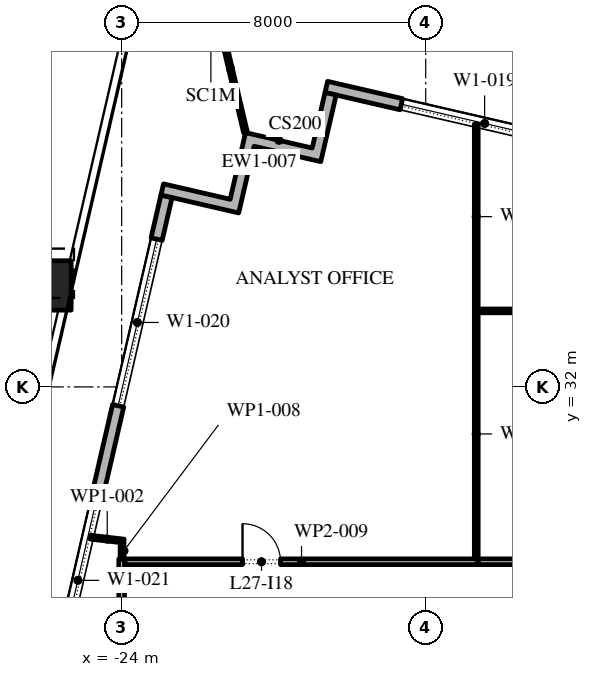
"""IFC4 building model, lengths in metres.
Left out: names, types, materials, properties, quantities, classifications, styles, units other than length and angle.
Written with IfcOpenShell. Run it as: python <this file> out.ifc"""

import sys

from ifc_helpers import new_model, si_unit, direction, frame, frame_2d, origin, origin_2d, place, context, subcontext, project, spatial, polyline, rectangle, outline, extrude, element, fill, save


model = new_model("IFC4")
c1 = context("Model", 3, precision=1e-05, world=origin(), true_north=direction((0.0, 1.0)))
c2 = subcontext(c1, "Body", "Model", "MODEL_VIEW")
j1 = project(units=[si_unit("LENGTHUNIT", "METRE"), si_unit("PLANEANGLEUNIT", "RADIAN")], contexts=[c1])
p1 = place(None, origin())
s1 = spatial("IfcSite", under=j1, at=p1, CompositionType="ELEMENT")
p2 = place(p1, origin())
s2 = spatial("IfcBuilding", under=s1, at=p2, CompositionType="ELEMENT")
p3 = place(p2, frame((0.0, 0.0, 126.6)))
s3 = spatial("IfcBuildingStorey", under=s2, at=p3, CompositionType="ELEMENT", Elevation=126.6)
p4 = place(p3, frame((-25.979, 34.67, 0.0), z_axis=(0.017444089556, 0.075687644385, 0.996978978829), x_axis=(-0.974454034257, 0.224587032398, 0.0)))
e1 = element("IfcColumn", 1, at=p4, inside=s3, PredefinedType="COLUMN", context=c2, shape_type="SweptSolid", body=[
    extrude(rectangle(XDim=1.3, YDim=1.3, at=origin_2d()), origin(), (0.0, 0.0, 1.0), 4.213),
])
p5 = place(p3, frame((31.078, 28.421, 0.0), z_axis=(0.0, 0.0, 1.0), x_axis=(-0.974370456532, 0.224949357493, 0.0)))
e2 = element("IfcWall", 2, at=p5, inside=s3, PredefinedType="STANDARD", context=c2, shape_type="SweptSolid", body=[
    extrude(rectangle(XDim=51.0, YDim=0.3, at=frame_2d((25.5, 0.0))), origin(), (0.0, 0.0, 1.0), 4.0),
])
p6 = place(p5, frame((1.875, 0.0, 0.45)))
e3 = element("IfcOpeningElement", 3, at=p6, cuts=e2, PredefinedType="OPENING", context=c2, shape_type="SweptSolid", body=[
    extrude(rectangle(XDim=4.5, YDim=2.95, at=frame_2d((2.25, 1.475))), frame((0.0, 0.16, 0.0), z_axis=(0.0, -1.0, 0.0), x_axis=(1.0, 0.0, 0.0)), (0.0, 0.0, 1.0), 0.32),
])
p7 = place(p5, frame((10.275, 0.0, 0.45)))
e4 = element("IfcOpeningElement", 4, at=p7, cuts=e2, PredefinedType="OPENING", context=c2, shape_type="SweptSolid", body=[
    extrude(rectangle(XDim=4.5, YDim=2.875, at=frame_2d((2.25, 1.438))), frame((0.0, 0.16, 0.0), z_axis=(0.0, -1.0, 0.0), x_axis=(1.0, 0.0, 0.0)), (0.0, 0.0, 1.0), 0.32),
])
p8 = place(p5, frame((18.825, 0.0, 0.45)))
e5 = element("IfcOpeningElement", 5, at=p8, cuts=e2, PredefinedType="OPENING", context=c2, shape_type="SweptSolid", body=[
    extrude(rectangle(XDim=4.5, YDim=2.825, at=frame_2d((2.25, 1.413))), frame((0.0, 0.16, 0.0), z_axis=(0.0, -1.0, 0.0), x_axis=(1.0, 0.0, 0.0)), (0.0, 0.0, 1.0), 0.32),
])
p9 = place(p5, frame((27.075, 0.0, 0.0)))
e6 = element("IfcOpeningElement", 6, at=p9, cuts=e2, PredefinedType="OPENING", context=c2, shape_type="SweptSolid", body=[
    extrude(rectangle(XDim=2.4, YDim=3.125, at=frame_2d((1.2, 1.562))), frame((0.0, 0.16, 0.0), z_axis=(0.0, -1.0, 0.0), x_axis=(1.0, 0.0, 0.0)), (0.0, 0.0, 1.0), 0.32),
])
p10 = place(p5, frame((35.925, 0.0, 0.45)))
e7 = element("IfcOpeningElement", 7, at=p10, cuts=e2, PredefinedType="OPENING", context=c2, shape_type="SweptSolid", body=[
    extrude(rectangle(XDim=4.5, YDim=2.575, at=frame_2d((2.25, 1.288))), frame((0.0, 0.16, 0.0), z_axis=(0.0, -1.0, 0.0), x_axis=(1.0, 0.0, 0.0)), (0.0, 0.0, 1.0), 0.32),
])
p11 = place(p5, frame((44.475, 0.0, 0.45)))
e8 = element("IfcOpeningElement", 8, at=p11, cuts=e2, PredefinedType="OPENING", context=c2, shape_type="SweptSolid", body=[
    extrude(rectangle(XDim=4.5, YDim=3.05, at=frame_2d((2.25, 1.525))), frame((0.0, 0.16, 0.0), z_axis=(0.0, -1.0, 0.0), x_axis=(1.0, 0.0, 0.0)), (0.0, 0.0, 1.0), 0.32),
])
p12 = place(p3, frame((-22.82, 37.016, 0.0), z_axis=(0.0, 0.0, 1.0), x_axis=(-0.224953880882, -0.974369412223, 0.0)))
e9 = element("IfcWall", 9, at=p12, inside=s3, PredefinedType="STANDARD", context=c2, shape_type="SweptSolid", body=[
    extrude(rectangle(XDim=49.5, YDim=0.3, at=frame_2d((24.75, 0.0))), origin(), (0.0, 0.0, 1.0), 4.0),
])
p13 = place(p12, frame((1.157, 0.0, 0.45)))
e10 = element("IfcOpeningElement", 10, at=p13, cuts=e9, PredefinedType="OPENING", context=c2, shape_type="SweptSolid", body=[
    extrude(rectangle(XDim=4.5, YDim=3.05, at=frame_2d((2.25, 1.525))), frame((0.0, 0.16, 0.0), z_axis=(0.0, -1.0, 0.0), x_axis=(1.0, 0.0, 0.0)), (0.0, 0.0, 1.0), 0.32),
])
p14 = place(p12, frame((8.121, 0.0, 0.45)))
e11 = element("IfcOpeningElement", 11, at=p14, cuts=e9, PredefinedType="OPENING", context=c2, shape_type="SweptSolid", body=[
    extrude(rectangle(XDim=4.5, YDim=3.05, at=frame_2d((2.25, 1.525))), frame((0.0, 0.16, 0.0), z_axis=(0.0, -1.0, 0.0), x_axis=(1.0, 0.0, 0.0)), (0.0, 0.0, 1.0), 0.32),
])
p15 = place(p12, frame((15.236, 0.0, 0.45)))
e12 = element("IfcOpeningElement", 12, at=p15, cuts=e9, PredefinedType="OPENING", context=c2, shape_type="SweptSolid", body=[
    extrude(rectangle(XDim=4.5, YDim=3.05, at=frame_2d((2.25, 1.525))), frame((0.0, 0.16, 0.0), z_axis=(0.0, -1.0, 0.0), x_axis=(1.0, 0.0, 0.0)), (0.0, 0.0, 1.0), 0.32),
])
p16 = place(p12, frame((23.4, 0.0, 0.0)))
e13 = element("IfcOpeningElement", 13, at=p16, cuts=e9, PredefinedType="OPENING", context=c2, shape_type="SweptSolid", body=[
    extrude(rectangle(XDim=2.4, YDim=3.5, at=frame_2d((1.2, 1.75))), frame((0.0, 0.16, 0.0), z_axis=(0.0, -1.0, 0.0), x_axis=(1.0, 0.0, 0.0)), (0.0, 0.0, 1.0), 0.32),
])
p17 = place(p12, frame((29.464, 0.0, 0.45)))
e14 = element("IfcOpeningElement", 14, at=p17, cuts=e9, PredefinedType="OPENING", context=c2, shape_type="SweptSolid", body=[
    extrude(rectangle(XDim=4.5, YDim=2.875, at=frame_2d((2.25, 1.438))), frame((0.0, 0.16, 0.0), z_axis=(0.0, -1.0, 0.0), x_axis=(1.0, 0.0, 0.0)), (0.0, 0.0, 1.0), 0.32),
])
p18 = place(p12, frame((36.579, 0.0, 0.45)))
e15 = element("IfcOpeningElement", 15, at=p18, cuts=e9, PredefinedType="OPENING", context=c2, shape_type="SweptSolid", body=[
    extrude(rectangle(XDim=4.5, YDim=2.675, at=frame_2d((2.25, 1.337))), frame((0.0, 0.16, 0.0), z_axis=(0.0, -1.0, 0.0), x_axis=(1.0, 0.0, 0.0)), (0.0, 0.0, 1.0), 0.32),
])
p19 = place(p12, frame((43.693, 0.0, 0.45)))
e16 = element("IfcOpeningElement", 16, at=p19, cuts=e9, PredefinedType="OPENING", context=c2, shape_type="SweptSolid", body=[
    extrude(rectangle(XDim=4.5, YDim=3.05, at=frame_2d((2.25, 1.525))), frame((0.0, 0.16, 0.0), z_axis=(0.0, -1.0, 0.0), x_axis=(1.0, 0.0, 0.0)), (0.0, 0.0, 1.0), 0.32),
])
p20 = place(p3, origin())
e17 = element("IfcWall", 17, at=p20, inside=s3, PredefinedType="STANDARD", context=c2, shape_type="SweptSolid", body=[
    extrude(outline(polyline([(-22.967, 37.049), (-22.899, 37.342), (-21.145, 36.937), (-20.74, 38.691), (-18.986, 38.286), (-18.649, 39.747), (-18.357, 39.68), (-18.762, 37.926), (-20.515, 38.331), (-20.92, 36.577), (-22.967, 37.049)])), origin(), (0.0, 0.0, 1.0), 4.0),
])
p21 = place(p3, frame((-20.74, 38.691, -0.05), z_axis=(0.0, 0.0, 1.0), x_axis=(-0.23016174079, 0.973152389442, 0.0)))
e18 = element("IfcWall", 18, at=p21, inside=s3, PredefinedType="STANDARD", context=c2, shape_type="SweptSolid", body=[
    extrude(rectangle(XDim=3.455, YDim=0.1, at=frame_2d((1.728, 0.0))), origin(), (0.0, 0.0, 1.0), 4.05),
])
p22 = place(p3, frame((-24.82, 28.045, 0.0), z_axis=(0.0, 0.0, 1.0), x_axis=(0.993501545499, -0.113818623659, 0.0)))
e19 = element("IfcWall", 19, at=p22, inside=s3, PredefinedType="PARTITIONING", context=c2, shape_type="SweptSolid", body=[
    extrude(rectangle(XDim=0.886, YDim=0.1, at=frame_2d((0.443, 0.0))), origin(), (0.0, 0.0, 1.0), 4.0),
])
p23 = place(p3, frame((-24.0, 3.45, 0.0), z_axis=(0.0, 0.0, 1.0), x_axis=(0.0, 1.0, 0.0)))
e20 = element("IfcWall", 20, at=p23, inside=s3, PredefinedType="PARTITIONING", context=c2, shape_type="SweptSolid", body=[
    extrude(rectangle(XDim=24.025, YDim=0.15, at=frame_2d((12.013, 0.0))), origin(), (0.0, 0.0, 1.0), 4.0),
])
p24 = place(p23, frame((16.3, 0.0, 0.0)))
e21 = element("IfcOpeningElement", 21, at=p24, cuts=e20, PredefinedType="OPENING", context=c2, shape_type="SweptSolid", body=[
    extrude(rectangle(XDim=1.0, YDim=2.1, at=frame_2d((0.5, 1.05))), frame((0.0, 0.085, 0.0), z_axis=(0.0, -1.0, 0.0), x_axis=(1.0, 0.0, 0.0)), (0.0, 0.0, 1.0), 0.17),
])
p25 = place(p3, frame((-23.99, 27.475, 0.0), z_axis=(0.0, 0.0, 1.0), x_axis=(0.0, 1.0, 0.0)))
e22 = element("IfcWall", 22, at=p25, inside=s3, PredefinedType="PARTITIONING", context=c2, shape_type="SweptSolid", body=[
    extrude(rectangle(XDim=0.425, YDim=0.1, at=frame_2d((0.212, 0.0))), origin(), (0.0, 0.0, 1.0), 4.0),
])
p26 = place(p3, frame((-23.915, 27.4, 0.0), z_axis=(0.0, 0.0, 1.0), x_axis=(1.0, 0.0, 0.0)))
e23 = element("IfcWall", 23, at=p26, inside=s3, PredefinedType="PARTITIONING", context=c2, shape_type="SweptSolid", body=[
    extrude(rectangle(XDim=9.295, YDim=0.15, at=frame_2d((4.647, 0.0))), origin(), (0.0, 0.0, 1.0), 4.0),
])
p27 = place(p26, frame((3.095, 0.0, 0.0)))
e24 = element("IfcOpeningElement", 24, at=p27, cuts=e23, PredefinedType="OPENING", context=c2, shape_type="SweptSolid", body=[
    extrude(rectangle(XDim=1.0, YDim=2.1, at=frame_2d((0.5, 1.05))), frame((0.0, 0.085, 0.0), z_axis=(0.0, -1.0, 0.0), x_axis=(1.0, 0.0, 0.0)), (0.0, 0.0, 1.0), 0.17),
])
p28 = place(p3, frame((-14.67, 27.475, 0.0), z_axis=(0.0, 0.0, 1.0), x_axis=(0.0, 1.0, 0.0)))
e25 = element("IfcWall", 25, at=p28, inside=s3, PredefinedType="PARTITIONING", context=c2, shape_type="SweptSolid", body=[
    extrude(rectangle(XDim=6.575, YDim=0.1, at=frame_2d((3.288, 0.0))), origin(), (0.0, 0.0, 1.0), 4.0),
])
p29 = place(p3, frame((-14.62, 27.4, 0.0), z_axis=(0.0, 0.0, 1.0), x_axis=(1.0, 0.0, 0.0)))
e26 = element("IfcWall", 26, at=p29, inside=s3, PredefinedType="PARTITIONING", context=c2, shape_type="SweptSolid", body=[
    extrude(rectangle(XDim=6.695, YDim=0.15, at=frame_2d((3.348, 0.0))), origin(), (0.0, 0.0, 1.0), 4.0),
])
p30 = place(p3, frame((-14.67, 34.05, 0.0), z_axis=(0.0, 0.0, 1.0), x_axis=(0.0, 1.0, 0.0)))
e27 = element("IfcWall", 27, at=p30, inside=s3, PredefinedType="PARTITIONING", context=c2, shape_type="SweptSolid", body=[
    extrude(rectangle(XDim=4.861, YDim=0.1, at=frame_2d((2.43, 0.0))), origin(), (0.0, 0.0, 1.0), 4.0),
])
p31 = place(p3, frame((-3.95, 34.0, 0.0), z_axis=(0.0, 0.0, 1.0), x_axis=(-1.0, 0.0, 0.0)))
e28 = element("IfcWall", 28, at=p31, inside=s3, PredefinedType="PARTITIONING", context=c2, shape_type="SweptSolid", body=[
    extrude(rectangle(XDim=10.67, YDim=0.1, at=frame_2d((5.335, 0.0))), origin(), (0.0, 0.0, 1.0), 4.0),
])
p32 = place(p31, frame((7.0, 0.0, 0.0)))
e29 = element("IfcOpeningElement", 29, at=p32, cuts=e28, PredefinedType="OPENING", context=c2, shape_type="SweptSolid", body=[
    extrude(rectangle(XDim=0.9, YDim=2.1, at=frame_2d((0.45, 1.05))), frame((0.0, 0.06, 0.0), z_axis=(0.0, -1.0, 0.0), x_axis=(1.0, 0.0, 0.0)), (0.0, 0.0, 1.0), 0.12),
])
p33 = place(p11, origin())
e30 = element("IfcWindow", 30, at=p33, inside=s3, PartitioningType="DOUBLE_PANEL_VERTICAL", PredefinedType="WINDOW", context=c2, shape_type="SweptSolid", body=[
    extrude(rectangle(XDim=4.5, YDim=3.05, at=frame_2d((2.25, 1.525))), frame((0.0, 0.03, 0.0), z_axis=(0.0, -1.0, 0.0), x_axis=(1.0, 0.0, 0.0)), (0.0, 0.0, 1.0), 0.06),
])
fill(e8, e30)
p34 = place(p13, origin())
e31 = element("IfcWindow", 31, at=p34, inside=s3, PartitioningType="DOUBLE_PANEL_VERTICAL", PredefinedType="WINDOW", context=c2, shape_type="SweptSolid", body=[
    extrude(rectangle(XDim=4.5, YDim=3.05, at=frame_2d((2.25, 1.525))), frame((0.0, 0.03, 0.0), z_axis=(0.0, -1.0, 0.0), x_axis=(1.0, 0.0, 0.0)), (0.0, 0.0, 1.0), 0.06),
])
fill(e10, e31)
p35 = place(p14, origin())
e32 = element("IfcWindow", 32, at=p35, inside=s3, PartitioningType="DOUBLE_PANEL_VERTICAL", PredefinedType="WINDOW", context=c2, shape_type="SweptSolid", body=[
    extrude(rectangle(XDim=4.5, YDim=3.05, at=frame_2d((2.25, 1.525))), frame((0.0, 0.03, 0.0), z_axis=(0.0, -1.0, 0.0), x_axis=(1.0, 0.0, 0.0)), (0.0, 0.0, 1.0), 0.06),
])
fill(e11, e32)
p36 = place(p27, origin())
e33 = element("IfcDoor", 33, at=p36, inside=s3, OperationType="SINGLE_SWING_RIGHT", PredefinedType="DOOR", context=c2, shape_type="SweptSolid", body=[
    extrude(rectangle(XDim=1.0, YDim=2.1, at=frame_2d((0.5, 1.05))), frame((0.0, 0.025, 0.0), z_axis=(0.0, -1.0, 0.0), x_axis=(1.0, 0.0, 0.0)), (0.0, 0.0, 1.0), 0.05),
])
fill(e24, e33)
save(model, sys.argv[1])
